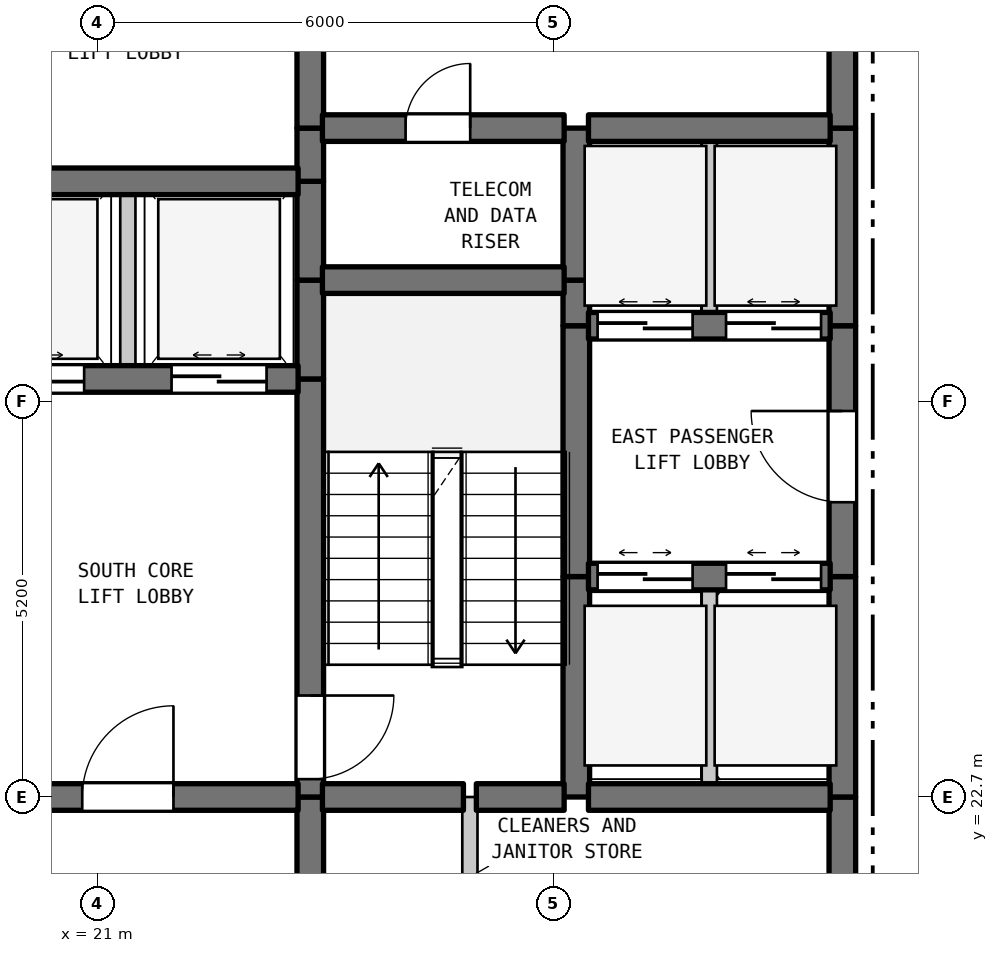
"""IFC4 building model, lengths in metres.
Left out: names, types, materials, properties, quantities, classifications, styles, units other than length and angle.
Written with IfcOpenShell. Run it as: python <this file> out.ifc"""

import sys

from ifc_helpers import new_model, si_unit, direction, frame, frame_2d, origin, place, context, subcontext, project, spatial, rectangle, extrude, element, fill, save


model = new_model("IFC4")
c1 = context("Model", 3, precision=1e-05, world=origin(), true_north=direction((0.0, 1.0)))
c2 = subcontext(c1, "Body", "Model", "MODEL_VIEW")
j1 = project(units=[si_unit("LENGTHUNIT", "METRE"), si_unit("PLANEANGLEUNIT", "RADIAN")], contexts=[c1])
p1 = place(None, origin())
s1 = spatial("IfcSite", under=j1, at=p1, CompositionType="ELEMENT")
p2 = place(p1, origin())
s2 = spatial("IfcBuilding", under=s1, at=p2, CompositionType="ELEMENT")
p3 = place(p2, frame((0.0, 0.0, 116.8)))
s3 = spatial("IfcBuildingStorey", under=s2, at=p3, CompositionType="ELEMENT", Elevation=116.8)
p4 = place(p3, frame((21.4, 28.2, 0.0), z_axis=(0.0, 0.0, 1.0), x_axis=(0.0, 1.0, 0.0)))
e1 = element("IfcWall", 1, at=p4, inside=s3, PredefinedType="STANDARD", context=c2, shape_type="SweptSolid", body=[
    extrude(rectangle(XDim=2.6, YDim=0.2, at=frame_2d((1.3, 0.0))), origin(), (0.0, 0.0, 1.0), 3.38),
])
p5 = place(p3, frame((23.8, 19.5, 0.0), z_axis=(0.0, 0.0, 1.0), x_axis=(0.0, 1.0, 0.0)))
e2 = element("IfcWall", 2, at=p5, inside=s3, PredefinedType="SHEAR", context=c2, shape_type="SweptSolid", body=[
    extrude(rectangle(XDim=3.2, YDim=0.35, at=frame_2d((1.6, 0.0))), origin(), (0.0, 0.0, 1.0), 3.38),
])
p6 = place(p3, frame((23.8, 22.7, 0.0), z_axis=(0.0, 0.0, 1.0), x_axis=(0.0, 1.0, 0.0)))
e3 = element("IfcWall", 3, at=p6, inside=s3, PredefinedType="SHEAR", context=c2, shape_type="SweptSolid", body=[
    extrude(rectangle(XDim=5.5, YDim=0.35, at=frame_2d((2.75, 0.0))), origin(), (0.0, 0.0, 1.0), 3.38),
])
p7 = place(p6, frame((0.235, 0.0, 0.0)))
e4 = element("IfcOpeningElement", 4, at=p7, cuts=e3, PredefinedType="OPENING", context=c2, shape_type="SweptSolid", body=[
    extrude(rectangle(XDim=1.1, YDim=2.15, at=frame_2d((0.55, 1.075))), frame((0.0, 0.185, 0.0), z_axis=(0.0, -1.0, 0.0), x_axis=(1.0, 0.0, 0.0)), (0.0, 0.0, 1.0), 0.37),
])
for number, where, z_axis, x_axis in (
    (5, (23.8, 28.2, 0.0), (0.0, 0.0, 1.0), (0.0, 1.0, 0.0)),
    (6, (23.8, 29.5, 0.0), (0.0, 0.0, 1.0), (0.0, 1.0, 0.0)),
):
    element("IfcWall", number, at=place(p3, frame(where, z_axis=z_axis, x_axis=x_axis)), inside=s3, PredefinedType="SHEAR", context=c2, shape_type="SweptSolid", body=[
        extrude(rectangle(XDim=1.3, YDim=0.35, at=frame_2d((0.65, 0.0))), origin(), (0.0, 0.0, 1.0), 3.38),
    ])
p8 = place(p3, frame((23.8, 30.8, 0.0), z_axis=(0.0, 0.0, 1.0), x_axis=(0.0, 1.0, 0.0)))
e7 = element("IfcWall", 7, at=p8, inside=s3, PredefinedType="SHEAR", context=c2, shape_type="SweptSolid", body=[
    extrude(rectangle(XDim=0.7, YDim=0.35, at=frame_2d((0.35, 0.0))), origin(), (0.0, 0.0, 1.0), 3.38),
])
p9 = place(p3, frame((23.8, 31.5, 0.0), z_axis=(0.0, 0.0, 1.0), x_axis=(0.0, 1.0, 0.0)))
e8 = element("IfcWall", 8, at=p9, inside=s3, PredefinedType="SHEAR", context=c2, shape_type="SweptSolid", body=[
    extrude(rectangle(XDim=3.5, YDim=0.35, at=frame_2d((1.75, 0.0))), origin(), (0.0, 0.0, 1.0), 3.38),
])
p10 = place(p9, frame((1.127, 0.0, 0.0)))
e9 = element("IfcOpeningElement", 9, at=p10, cuts=e8, PredefinedType="OPENING", context=c2, shape_type="SweptSolid", body=[
    extrude(rectangle(XDim=1.1, YDim=2.15, at=frame_2d((0.55, 1.075))), frame((0.0, 0.185, 0.0), z_axis=(0.0, -1.0, 0.0), x_axis=(1.0, 0.0, 0.0)), (0.0, 0.0, 1.0), 0.37),
])
p11 = place(p3, frame((25.9, 19.5, 0.0), z_axis=(0.0, 0.0, 1.0), x_axis=(0.0, 1.0, 0.0)))
e10 = element("IfcWall", 10, at=p11, inside=s3, PredefinedType="STANDARD", context=c2, shape_type="SweptSolid", body=[
    extrude(rectangle(XDim=3.2, YDim=0.2, at=frame_2d((1.6, 0.0))), origin(), (0.0, 0.0, 1.0), 3.38),
])
p12 = place(p3, frame((27.3, 22.7, 0.0), z_axis=(0.0, 0.0, 1.0), x_axis=(0.0, 1.0, 0.0)))
e11 = element("IfcWall", 11, at=p12, inside=s3, PredefinedType="SHEAR", context=c2, shape_type="SweptSolid", body=[
    extrude(rectangle(XDim=2.9, YDim=0.35, at=frame_2d((1.45, 0.0))), origin(), (0.0, 0.0, 1.0), 3.38),
])
p13 = place(p3, frame((27.3, 25.6, 0.0), z_axis=(0.0, 0.0, 1.0), x_axis=(0.0, 1.0, 0.0)))
e12 = element("IfcWall", 12, at=p13, inside=s3, PredefinedType="SHEAR", context=c2, shape_type="SweptSolid", body=[
    extrude(rectangle(XDim=3.3, YDim=0.35, at=frame_2d((1.65, 0.0))), origin(), (0.0, 0.0, 1.0), 3.38),
])
p14 = place(p3, frame((27.3, 28.9, 0.0), z_axis=(0.0, 0.0, 1.0), x_axis=(0.0, 1.0, 0.0)))
e13 = element("IfcWall", 13, at=p14, inside=s3, PredefinedType="SHEAR", context=c2, shape_type="SweptSolid", body=[
    extrude(rectangle(XDim=0.6, YDim=0.35, at=frame_2d((0.3, 0.0))), origin(), (0.0, 0.0, 1.0), 3.38),
])
p15 = place(p3, frame((27.3, 29.5, 0.0), z_axis=(0.0, 0.0, 1.0), x_axis=(0.0, 1.0, 0.0)))
e14 = element("IfcWall", 14, at=p15, inside=s3, PredefinedType="SHEAR", context=c2, shape_type="SweptSolid", body=[
    extrude(rectangle(XDim=2.0, YDim=0.35, at=frame_2d((1.0, 0.0))), origin(), (0.0, 0.0, 1.0), 3.38),
])
p16 = place(p3, frame((29.05, 22.7, 0.0), z_axis=(0.0, 0.0, 1.0), x_axis=(0.0, 1.0, 0.0)))
e15 = element("IfcWall", 15, at=p16, inside=s3, PredefinedType="STANDARD", context=c2, shape_type="SweptSolid", body=[
    extrude(rectangle(XDim=2.9, YDim=0.2, at=frame_2d((1.45, 0.0))), origin(), (0.0, 0.0, 1.0), 3.38),
])
p17 = place(p3, frame((29.05, 28.9, 0.0), z_axis=(0.0, 0.0, 1.0), x_axis=(0.0, 1.0, 0.0)))
e16 = element("IfcWall", 16, at=p17, inside=s3, PredefinedType="STANDARD", context=c2, shape_type="SweptSolid", body=[
    extrude(rectangle(XDim=2.6, YDim=0.2, at=frame_2d((1.3, 0.0))), origin(), (0.0, 0.0, 1.0), 3.38),
])
p18 = place(p3, frame((30.8, 19.5, 0.0), z_axis=(0.0, 0.0, 1.0), x_axis=(0.0, 1.0, 0.0)))
e17 = element("IfcWall", 17, at=p18, inside=s3, PredefinedType="SHEAR", context=c2, shape_type="SweptSolid", body=[
    extrude(rectangle(XDim=3.2, YDim=0.35, at=frame_2d((1.6, 0.0))), origin(), (0.0, 0.0, 1.0), 3.38),
])
p19 = place(p3, frame((30.8, 22.7, 0.0), z_axis=(0.0, 0.0, 1.0), x_axis=(0.0, 1.0, 0.0)))
e18 = element("IfcWall", 18, at=p19, inside=s3, PredefinedType="SHEAR", context=c2, shape_type="SweptSolid", body=[
    extrude(rectangle(XDim=2.9, YDim=0.35, at=frame_2d((1.45, 0.0))), origin(), (0.0, 0.0, 1.0), 3.38),
])
p20 = place(p3, frame((30.8, 25.6, 0.0), z_axis=(0.0, 0.0, 1.0), x_axis=(0.0, 1.0, 0.0)))
e19 = element("IfcWall", 19, at=p20, inside=s3, PredefinedType="SHEAR", context=c2, shape_type="SweptSolid", body=[
    extrude(rectangle(XDim=3.3, YDim=0.35, at=frame_2d((1.65, 0.0))), origin(), (0.0, 0.0, 1.0), 3.38),
])
p21 = place(p20, frame((0.978, 0.0, 0.0)))
e20 = element("IfcOpeningElement", 20, at=p21, cuts=e19, PredefinedType="OPENING", context=c2, shape_type="SweptSolid", body=[
    extrude(rectangle(XDim=1.2, YDim=2.2, at=frame_2d((0.6, 1.1))), frame((0.0, 0.185, 0.0), z_axis=(0.0, -1.0, 0.0), x_axis=(1.0, 0.0, 0.0)), (0.0, 0.0, 1.0), 0.37),
])
p22 = place(p3, frame((30.8, 28.9, 0.0), z_axis=(0.0, 0.0, 1.0), x_axis=(0.0, 1.0, 0.0)))
e21 = element("IfcWall", 21, at=p22, inside=s3, PredefinedType="SHEAR", context=c2, shape_type="SweptSolid", body=[
    extrude(rectangle(XDim=2.6, YDim=0.35, at=frame_2d((1.3, 0.0))), origin(), (0.0, 0.0, 1.0), 3.38),
])
p23 = place(p3, frame((30.8, 31.5, 0.0), z_axis=(0.0, 0.0, 1.0), x_axis=(0.0, 1.0, 0.0)))
e22 = element("IfcWall", 22, at=p23, inside=s3, PredefinedType="SHEAR", context=c2, shape_type="SweptSolid", body=[
    extrude(rectangle(XDim=3.5, YDim=0.35, at=frame_2d((1.75, 0.0))), origin(), (0.0, 0.0, 1.0), 3.38),
])
p24 = place(p23, frame((1.15, 0.0, 0.0)))
e23 = element("IfcOpeningElement", 23, at=p24, cuts=e22, PredefinedType="OPENING", context=c2, shape_type="SweptSolid", body=[
    extrude(rectangle(XDim=1.2, YDim=2.2, at=frame_2d((0.6, 1.1))), frame((0.0, 0.185, 0.0), z_axis=(0.0, -1.0, 0.0), x_axis=(1.0, 0.0, 0.0)), (0.0, 0.0, 1.0), 0.37),
])
p25 = place(p3, frame((19.16, 22.7, 0.0), z_axis=(0.0, 0.0, 1.0), x_axis=(1.0, 0.0, 0.0)))
e24 = element("IfcWall", 24, at=p25, inside=s3, PredefinedType="SHEAR", context=c2, shape_type="SweptSolid", body=[
    extrude(rectangle(XDim=4.48, YDim=0.35, at=frame_2d((2.24, 0.0))), origin(), (0.0, 0.0, 1.0), 3.38),
])
p26 = place(p25, frame((1.64, 0.0, 0.0)))
e25 = element("IfcOpeningElement", 25, at=p26, cuts=e24, PredefinedType="OPENING", context=c2, shape_type="SweptSolid", body=[
    extrude(rectangle(XDim=1.2, YDim=2.2, at=frame_2d((0.6, 1.1))), frame((0.0, 0.185, 0.0), z_axis=(0.0, -1.0, 0.0), x_axis=(1.0, 0.0, 0.0)), (0.0, 0.0, 1.0), 0.37),
])
p27 = place(p3, frame((23.96, 22.7, 0.0), z_axis=(0.0, 0.0, 1.0), x_axis=(1.0, 0.0, 0.0)))
e26 = element("IfcWall", 26, at=p27, inside=s3, PredefinedType="SHEAR", context=c2, shape_type="SweptSolid", body=[
    extrude(rectangle(XDim=1.855, YDim=0.35, at=frame_2d((0.927, 0.0))), origin(), (0.0, 0.0, 1.0), 3.38),
])
p28 = place(p3, frame((25.985, 22.7, 0.0), z_axis=(0.0, 0.0, 1.0), x_axis=(1.0, 0.0, 0.0)))
e27 = element("IfcWall", 27, at=p28, inside=s3, PredefinedType="SHEAR", context=c2, shape_type="SweptSolid", body=[
    extrude(rectangle(XDim=1.155, YDim=0.35, at=frame_2d((0.577, 0.0))), origin(), (0.0, 0.0, 1.0), 3.38),
])
p29 = place(p3, frame((27.46, 22.7, 0.0), z_axis=(0.0, 0.0, 1.0), x_axis=(1.0, 0.0, 0.0)))
e28 = element("IfcWall", 28, at=p29, inside=s3, PredefinedType="SHEAR", context=c2, shape_type="SweptSolid", body=[
    extrude(rectangle(XDim=3.18, YDim=0.35, at=frame_2d((1.59, 0.0))), origin(), (0.0, 0.0, 1.0), 3.38),
])
p30 = place(p3, frame((27.46, 25.6, 0.0), z_axis=(0.0, 0.0, 1.0), x_axis=(1.0, 0.0, 0.0)))
e29 = element("IfcWall", 29, at=p30, inside=s3, PredefinedType="SHEAR", context=c2, shape_type="SweptSolid", body=[
    extrude(rectangle(XDim=3.18, YDim=0.35, at=frame_2d((1.59, 0.0))), origin(), (0.0, 0.0, 1.0), 3.38),
])
p31 = place(p30, frame((0.12, 0.0, 0.0)))
e30 = element("IfcOpeningElement", 30, at=p31, cuts=e29, PredefinedType="OPENING", context=c2, shape_type="SweptSolid", body=[
    extrude(rectangle(XDim=1.25, YDim=2.2, at=frame_2d((0.625, 1.1))), frame((0.0, 0.185, 0.0), z_axis=(0.0, -1.0, 0.0), x_axis=(1.0, 0.0, 0.0)), (0.0, 0.0, 1.0), 0.37),
])
p32 = place(p30, frame((1.81, 0.0, 0.0)))
e31 = element("IfcOpeningElement", 31, at=p32, cuts=e29, PredefinedType="OPENING", context=c2, shape_type="SweptSolid", body=[
    extrude(rectangle(XDim=1.25, YDim=2.2, at=frame_2d((0.625, 1.1))), frame((0.0, 0.185, 0.0), z_axis=(0.0, -1.0, 0.0), x_axis=(1.0, 0.0, 0.0)), (0.0, 0.0, 1.0), 0.37),
])
p33 = place(p3, frame((19.16, 28.2, 0.0), z_axis=(0.0, 0.0, 1.0), x_axis=(1.0, 0.0, 0.0)))
e32 = element("IfcWall", 32, at=p33, inside=s3, PredefinedType="SHEAR", context=c2, shape_type="SweptSolid", body=[
    extrude(rectangle(XDim=4.48, YDim=0.35, at=frame_2d((2.24, 0.0))), origin(), (0.0, 0.0, 1.0), 3.38),
])
p34 = place(p33, frame((0.415, 0.0, 0.0)))
e33 = element("IfcOpeningElement", 33, at=p34, cuts=e32, PredefinedType="OPENING", context=c2, shape_type="SweptSolid", body=[
    extrude(rectangle(XDim=1.25, YDim=2.2, at=frame_2d((0.625, 1.1))), frame((0.0, 0.185, 0.0), z_axis=(0.0, -1.0, 0.0), x_axis=(1.0, 0.0, 0.0)), (0.0, 0.0, 1.0), 0.37),
])
p35 = place(p33, frame((2.815, 0.0, 0.0)))
e34 = element("IfcOpeningElement", 34, at=p35, cuts=e32, PredefinedType="OPENING", context=c2, shape_type="SweptSolid", body=[
    extrude(rectangle(XDim=1.25, YDim=2.2, at=frame_2d((0.625, 1.1))), frame((0.0, 0.185, 0.0), z_axis=(0.0, -1.0, 0.0), x_axis=(1.0, 0.0, 0.0)), (0.0, 0.0, 1.0), 0.37),
])
p36 = place(p3, frame((27.46, 28.9, 0.0), z_axis=(0.0, 0.0, 1.0), x_axis=(1.0, 0.0, 0.0)))
e35 = element("IfcWall", 35, at=p36, inside=s3, PredefinedType="SHEAR", context=c2, shape_type="SweptSolid", body=[
    extrude(rectangle(XDim=3.18, YDim=0.35, at=frame_2d((1.59, 0.0))), origin(), (0.0, 0.0, 1.0), 3.38),
])
p37 = place(p36, frame((0.12, 0.0, 0.0)))
e36 = element("IfcOpeningElement", 36, at=p37, cuts=e35, PredefinedType="OPENING", context=c2, shape_type="SweptSolid", body=[
    extrude(rectangle(XDim=1.25, YDim=2.2, at=frame_2d((0.625, 1.1))), frame((0.0, 0.185, 0.0), z_axis=(0.0, -1.0, 0.0), x_axis=(1.0, 0.0, 0.0)), (0.0, 0.0, 1.0), 0.37),
])
p38 = place(p36, frame((1.81, 0.0, 0.0)))
e37 = element("IfcOpeningElement", 37, at=p38, cuts=e35, PredefinedType="OPENING", context=c2, shape_type="SweptSolid", body=[
    extrude(rectangle(XDim=1.25, YDim=2.2, at=frame_2d((0.625, 1.1))), frame((0.0, 0.185, 0.0), z_axis=(0.0, -1.0, 0.0), x_axis=(1.0, 0.0, 0.0)), (0.0, 0.0, 1.0), 0.37),
])
p39 = place(p3, frame((23.96, 29.5, 0.0), z_axis=(0.0, 0.0, 1.0), x_axis=(1.0, 0.0, 0.0)))
e38 = element("IfcWall", 38, at=p39, inside=s3, PredefinedType="SHEAR", context=c2, shape_type="SweptSolid", body=[
    extrude(rectangle(XDim=3.18, YDim=0.35, at=frame_2d((1.59, 0.0))), origin(), (0.0, 0.0, 1.0), 3.38),
])
p40 = place(p3, frame((19.16, 30.8, 0.0), z_axis=(0.0, 0.0, 1.0), x_axis=(1.0, 0.0, 0.0)))
e39 = element("IfcWall", 39, at=p40, inside=s3, PredefinedType="SHEAR", context=c2, shape_type="SweptSolid", body=[
    extrude(rectangle(XDim=4.48, YDim=0.35, at=frame_2d((2.24, 0.0))), origin(), (0.0, 0.0, 1.0), 3.38),
])
p41 = place(p3, frame((23.96, 31.5, 0.0), z_axis=(0.0, 0.0, 1.0), x_axis=(1.0, 0.0, 0.0)))
e40 = element("IfcWall", 40, at=p41, inside=s3, PredefinedType="SHEAR", context=c2, shape_type="SweptSolid", body=[
    extrude(rectangle(XDim=3.18, YDim=0.35, at=frame_2d((1.59, 0.0))), origin(), (0.0, 0.0, 1.0), 3.38),
])
p42 = place(p41, frame((1.094, 0.0, 0.0)))
e41 = element("IfcOpeningElement", 41, at=p42, cuts=e40, PredefinedType="OPENING", context=c2, shape_type="SweptSolid", body=[
    extrude(rectangle(XDim=0.85, YDim=2.1, at=frame_2d((0.425, 1.05))), frame((0.0, 0.185, 0.0), z_axis=(0.0, -1.0, 0.0), x_axis=(1.0, 0.0, 0.0)), (0.0, 0.0, 1.0), 0.37),
])
p43 = place(p3, frame((27.46, 31.5, 0.0), z_axis=(0.0, 0.0, 1.0), x_axis=(1.0, 0.0, 0.0)))
e42 = element("IfcWall", 42, at=p43, inside=s3, PredefinedType="SHEAR", context=c2, shape_type="SweptSolid", body=[
    extrude(rectangle(XDim=3.18, YDim=0.35, at=frame_2d((1.59, 0.0))), origin(), (0.0, 0.0, 1.0), 3.38),
])
p44 = place(p7, frame((1.1, 0.0, 0.0), z_axis=(0.0, 0.0, 1.0), x_axis=(-1.0, 0.0, 0.0)))
e43 = element("IfcDoor", 43, at=p44, inside=s3, OperationType="SINGLE_SWING_RIGHT", PredefinedType="DOOR", context=c2, shape_type="SweptSolid", body=[
    extrude(rectangle(XDim=1.1, YDim=2.15, at=frame_2d((0.55, 1.075))), frame((0.0, 0.025, 0.0), z_axis=(0.0, -1.0, 0.0), x_axis=(1.0, 0.0, 0.0)), (0.0, 0.0, 1.0), 0.05),
])
fill(e4, e43)
p45 = place(p21, origin())
e44 = element("IfcDoor", 44, at=p45, inside=s3, OperationType="SINGLE_SWING_RIGHT", PredefinedType="DOOR", context=c2, shape_type="SweptSolid", body=[
    extrude(rectangle(XDim=1.2, YDim=2.2, at=frame_2d((0.6, 1.1))), frame((0.0, 0.025, 0.0), z_axis=(0.0, -1.0, 0.0), x_axis=(1.0, 0.0, 0.0)), (0.0, 0.0, 1.0), 0.05),
])
fill(e20, e44)
p46 = place(p26, origin())
e45 = element("IfcDoor", 45, at=p46, inside=s3, OperationType="SINGLE_SWING_RIGHT", PredefinedType="DOOR", context=c2, shape_type="SweptSolid", body=[
    extrude(rectangle(XDim=1.2, YDim=2.2, at=frame_2d((0.6, 1.1))), frame((0.0, 0.025, 0.0), z_axis=(0.0, -1.0, 0.0), x_axis=(1.0, 0.0, 0.0)), (0.0, 0.0, 1.0), 0.05),
])
fill(e25, e45)
p47 = place(p31, origin())
e46 = element("IfcDoor", 46, at=p47, inside=s3, OperationType="DOUBLE_DOOR_SLIDING", PredefinedType="DOOR", context=c2, shape_type="SweptSolid", body=[
    extrude(rectangle(XDim=1.25, YDim=2.2, at=frame_2d((0.625, 1.1))), frame((0.0, 0.025, 0.0), z_axis=(0.0, -1.0, 0.0), x_axis=(1.0, 0.0, 0.0)), (0.0, 0.0, 1.0), 0.05),
])
fill(e30, e46)
p48 = place(p32, origin())
e47 = element("IfcDoor", 47, at=p48, inside=s3, OperationType="DOUBLE_DOOR_SLIDING", PredefinedType="DOOR", context=c2, shape_type="SweptSolid", body=[
    extrude(rectangle(XDim=1.25, YDim=2.2, at=frame_2d((0.625, 1.1))), frame((0.0, 0.025, 0.0), z_axis=(0.0, -1.0, 0.0), x_axis=(1.0, 0.0, 0.0)), (0.0, 0.0, 1.0), 0.05),
])
fill(e31, e47)
p49 = place(p34, origin())
e48 = element("IfcDoor", 48, at=p49, inside=s3, OperationType="DOUBLE_DOOR_SLIDING", PredefinedType="DOOR", context=c2, shape_type="SweptSolid", body=[
    extrude(rectangle(XDim=1.25, YDim=2.2, at=frame_2d((0.625, 1.1))), frame((0.0, 0.025, 0.0), z_axis=(0.0, -1.0, 0.0), x_axis=(1.0, 0.0, 0.0)), (0.0, 0.0, 1.0), 0.05),
])
fill(e33, e48)
p50 = place(p35, origin())
e49 = element("IfcDoor", 49, at=p50, inside=s3, OperationType="DOUBLE_DOOR_SLIDING", PredefinedType="DOOR", context=c2, shape_type="SweptSolid", body=[
    extrude(rectangle(XDim=1.25, YDim=2.2, at=frame_2d((0.625, 1.1))), frame((0.0, 0.025, 0.0), z_axis=(0.0, -1.0, 0.0), x_axis=(1.0, 0.0, 0.0)), (0.0, 0.0, 1.0), 0.05),
])
fill(e34, e49)
p51 = place(p37, origin())
e50 = element("IfcDoor", 50, at=p51, inside=s3, OperationType="DOUBLE_DOOR_SLIDING", PredefinedType="DOOR", context=c2, shape_type="SweptSolid", body=[
    extrude(rectangle(XDim=1.25, YDim=2.2, at=frame_2d((0.625, 1.1))), frame((0.0, 0.025, 0.0), z_axis=(0.0, -1.0, 0.0), x_axis=(1.0, 0.0, 0.0)), (0.0, 0.0, 1.0), 0.05),
])
fill(e36, e50)
p52 = place(p38, origin())
e51 = element("IfcDoor", 51, at=p52, inside=s3, OperationType="DOUBLE_DOOR_SLIDING", PredefinedType="DOOR", context=c2, shape_type="SweptSolid", body=[
    extrude(rectangle(XDim=1.25, YDim=2.2, at=frame_2d((0.625, 1.1))), frame((0.0, 0.025, 0.0), z_axis=(0.0, -1.0, 0.0), x_axis=(1.0, 0.0, 0.0)), (0.0, 0.0, 1.0), 0.05),
])
fill(e37, e51)
p53 = place(p42, origin())
e52 = element("IfcDoor", 52, at=p53, inside=s3, OperationType="SINGLE_SWING_RIGHT", PredefinedType="DOOR", context=c2, shape_type="SweptSolid", body=[
    extrude(rectangle(XDim=0.85, YDim=2.1, at=frame_2d((0.425, 1.05))), frame((0.0, 0.025, 0.0), z_axis=(0.0, -1.0, 0.0), x_axis=(1.0, 0.0, 0.0)), (0.0, 0.0, 1.0), 0.05),
])
fill(e41, e52)
save(model, sys.argv[1])
